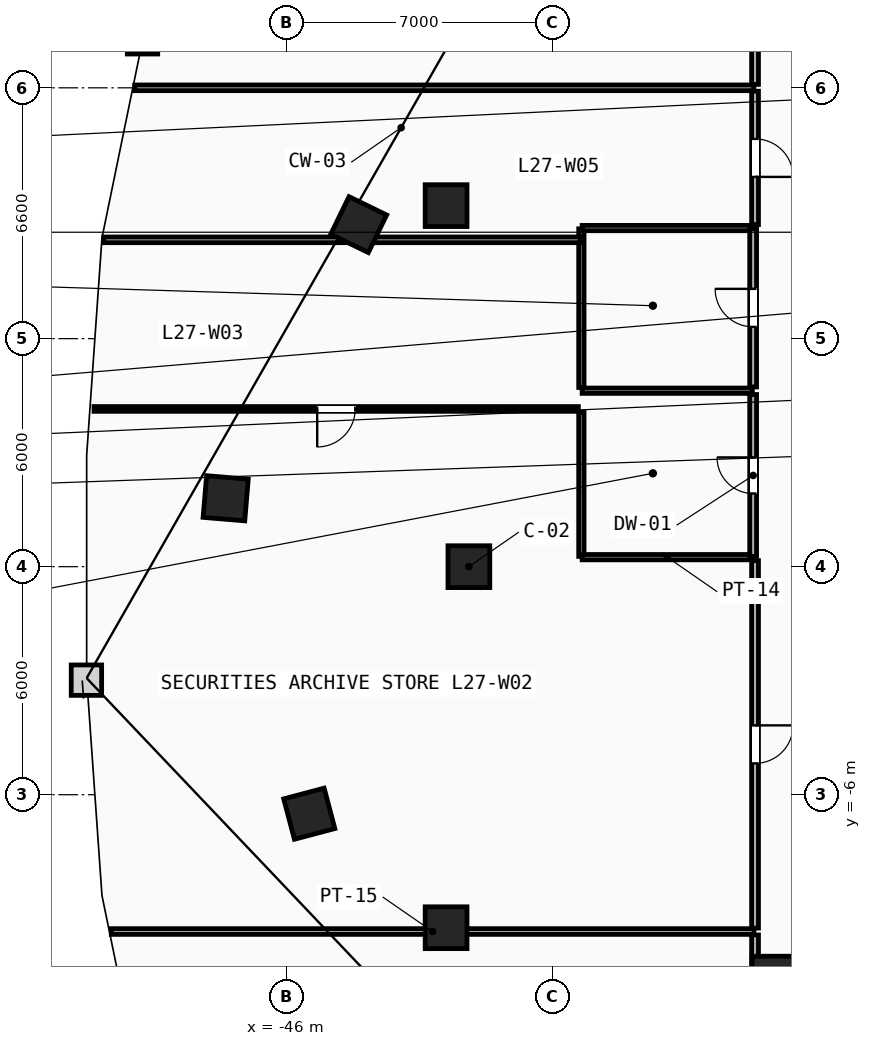
"""IFC4 building model, lengths in metres.
Left out: names, types, materials, properties, quantities, classifications, styles, units other than length and angle.
Written with IfcOpenShell. Run it as: python <this file> out.ifc"""

import sys

from ifc_helpers import new_model, si_unit, direction, frame, frame_2d, origin, origin_2d, place, context, subcontext, project, spatial, rectangle, extrude, element, fill, save


model = new_model("IFC4")
c1 = context("Model", 3, precision=1e-05, world=origin(), true_north=direction((0.0, 1.0)))
c2 = subcontext(c1, "Body", "Model", "MODEL_VIEW")
j1 = project(units=[si_unit("LENGTHUNIT", "METRE"), si_unit("PLANEANGLEUNIT", "RADIAN")], contexts=[c1])
p1 = place(None, origin())
s1 = spatial("IfcSite", under=j1, at=p1, CompositionType="ELEMENT")
p2 = place(p1, origin())
s2 = spatial("IfcBuilding", under=s1, at=p2, CompositionType="ELEMENT")
p3 = place(p2, frame((0.0, 0.0, 107.0)))
s3 = spatial("IfcBuildingStorey", under=s2, at=p3, CompositionType="ELEMENT", Elevation=107.0)
for number, where, z_axis, x_axis in (
    (1, (-41.2, 0.0, 0.0), (0.0, 0.0, 1.0), (1.0, 0.0, 0.0)),
    (2, (-41.8, 9.5, 0.0), (0.0, 0.0, 1.0), (1.0, 0.0, 0.0)),
    (3, (-41.8, -9.5, 0.0), (0.0, 0.0, 1.0), (1.0, 0.0, 0.0)),
    (4, (-33.2, -10.8, 0.0), (0.0, 0.0, 1.0), (1.0, 0.0, 0.0)),
    (5, (-44.1, 9.0, 0.0), (0.0, 0.0, 1.0), (-0.437, -0.899, 0.0)),
    (6, (-47.6, 1.8, 0.0), (0.0, 0.0, 1.0), (-0.084, -0.997, 0.0)),
    (7, (-45.4, -6.5, 0.0), (0.0, 0.0, 1.0), (0.256, -0.967, 0.0)),
):
    element("IfcColumn", number, at=place(p3, frame(where, z_axis=z_axis, x_axis=x_axis)), inside=s3, PredefinedType="COLUMN", context=c2, shape_type="SweptSolid", body=[
        extrude(rectangle(XDim=1.1, YDim=1.1, at=origin_2d()), origin(), (0.0, 0.0, 1.0), 3.6),
    ])
p4 = place(p3, frame((-38.24, 0.27, 0.0), z_axis=(0.0, 0.0, 1.0), x_axis=(0.0, 1.0, 0.0)))
e8 = element("IfcWall", 8, at=p4, inside=s3, PredefinedType="PARTITIONING", context=c2, shape_type="SweptSolid", body=[
    extrude(rectangle(XDim=3.795, YDim=0.14, at=frame_2d((1.897, 0.0))), origin(), (0.0, 0.0, 1.0), 3.3),
])
p5 = place(p3, frame((-38.24, 4.715, 0.0), z_axis=(0.0, 0.0, 1.0), x_axis=(0.0, 1.0, 0.0)))
e9 = element("IfcWall", 9, at=p5, inside=s3, PredefinedType="PARTITIONING", context=c2, shape_type="SweptSolid", body=[
    extrude(rectangle(XDim=4.175, YDim=0.14, at=frame_2d((2.087, 0.0))), origin(), (0.0, 0.0, 1.0), 3.3),
])
for number, where, z_axis, x_axis in (
    (10, (-38.22, 0.25, 0.0), (0.0, 0.0, 1.0), (1.0, 0.0, 0.0)),
    (11, (-38.22, 4.63, 0.0), (0.0, 0.0, 1.0), (1.0, 0.0, 0.0)),
    (12, (-38.22, 8.91, 0.0), (0.0, 0.0, 1.0), (1.0, 0.0, 0.0)),
):
    element("IfcWall", number, at=place(p3, frame(where, z_axis=z_axis, x_axis=x_axis)), inside=s3, PredefinedType="PARTITIONING", context=c2, shape_type="SweptSolid", body=[
        extrude(rectangle(XDim=4.48, YDim=0.14, at=frame_2d((2.24, 0.0))), origin(), (0.0, 0.0, 1.0), 3.3),
    ])
p6 = place(p3, frame((-33.72, 0.27, 0.0), z_axis=(0.0, 0.0, 1.0), x_axis=(0.0, 1.0, 0.0)))
e13 = element("IfcWall", 13, at=p6, inside=s3, PredefinedType="PARTITIONING", context=c2, shape_type="SweptSolid", body=[
    extrude(rectangle(XDim=4.26, YDim=0.18, at=frame_2d((2.13, 0.0))), origin(), (0.0, 0.0, 1.0), 3.3),
])
p7 = place(p6, frame((1.655, 0.0, 0.0)))
e14 = element("IfcOpeningElement", 14, at=p7, cuts=e13, PredefinedType="OPENING", context=c2, shape_type="SweptSolid", body=[
    extrude(rectangle(XDim=0.95, YDim=2.1, at=frame_2d((0.475, 1.05))), frame((0.0, 0.1, 0.0), z_axis=(0.0, -1.0, 0.0), x_axis=(1.0, 0.0, 0.0)), (0.0, 0.0, 1.0), 0.2),
])
p8 = place(p3, frame((-33.72, 4.73, 0.0), z_axis=(0.0, 0.0, 1.0), x_axis=(0.0, 1.0, 0.0)))
e15 = element("IfcWall", 15, at=p8, inside=s3, PredefinedType="PARTITIONING", context=c2, shape_type="SweptSolid", body=[
    extrude(rectangle(XDim=4.16, YDim=0.18, at=frame_2d((2.08, 0.0))), origin(), (0.0, 0.0, 1.0), 3.3),
])
p9 = place(p8, frame((1.58, 0.0, 0.0)))
e16 = element("IfcOpeningElement", 16, at=p9, cuts=e15, PredefinedType="OPENING", context=c2, shape_type="SweptSolid", body=[
    extrude(rectangle(XDim=1.0, YDim=2.15, at=frame_2d((0.5, 1.075))), frame((0.0, 0.1, 0.0), z_axis=(0.0, -1.0, 0.0), x_axis=(1.0, 0.0, 0.0)), (0.0, 0.0, 1.0), 0.2),
])
p10 = place(p3, frame((-50.61, -9.6, 0.0), z_axis=(0.0, 0.0, 1.0), x_axis=(1.0, 0.0, 0.0)))
e17 = element("IfcWall", 17, at=p10, inside=s3, PredefinedType="PARTITIONING", context=c2, shape_type="SweptSolid", body=[
    extrude(rectangle(XDim=16.91, YDim=0.15, at=frame_2d((8.455, 0.0))), origin(), (0.0, 0.0, 1.0), 2.605),
])
p11 = place(p3, frame((-50.809, 8.6, 0.0), z_axis=(0.0, 0.0, 1.0), x_axis=(1.0, 0.0, 0.0)))
e18 = element("IfcWall", 18, at=p11, inside=s3, PredefinedType="PARTITIONING", context=c2, shape_type="SweptSolid", body=[
    extrude(rectangle(XDim=12.539, YDim=0.15, at=frame_2d((6.269, 0.0))), origin(), (0.0, 0.0, 1.0), 3.3),
])
p12 = place(p3, frame((-49.993, 12.6, 0.0), z_axis=(0.0, 0.0, 1.0), x_axis=(1.0, 0.0, 0.0)))
e19 = element("IfcWall", 19, at=p12, inside=s3, PredefinedType="PARTITIONING", context=c2, shape_type="SweptSolid", body=[
    extrude(rectangle(XDim=16.293, YDim=0.15, at=frame_2d((8.146, 0.0))), origin(), (0.0, 0.0, 1.0), 3.3),
])
p13 = place(p3, frame((-33.67, -9.69, 0.0), z_axis=(0.0, 0.0, 1.0), x_axis=(0.0, -1.0, 0.0)))
e20 = element("IfcWall", 20, at=p13, inside=s3, PredefinedType="PARTITIONING", context=c2, shape_type="SweptSolid", body=[
    extrude(rectangle(XDim=1.71, YDim=0.18, at=frame_2d((0.855, 0.0))), origin(), (0.0, 0.0, 1.0), 3.3),
])
p14 = place(p3, frame((-33.67, 0.159, 0.0), z_axis=(0.0, 0.0, 1.0), x_axis=(0.0, -1.0, 0.0)))
e21 = element("IfcWall", 21, at=p14, inside=s3, PredefinedType="PARTITIONING", context=c2, shape_type="SweptSolid", body=[
    extrude(rectangle(XDim=9.669, YDim=0.18, at=frame_2d((4.834, 0.0))), origin(), (0.0, 0.0, 1.0), 3.3),
])
p15 = place(p14, frame((4.334, 0.0, 0.0)))
e22 = element("IfcOpeningElement", 22, at=p15, cuts=e21, PredefinedType="OPENING", context=c2, shape_type="SweptSolid", body=[
    extrude(rectangle(XDim=1.0, YDim=2.15, at=frame_2d((0.5, 1.075))), frame((0.0, 0.1, 0.0), z_axis=(0.0, -1.0, 0.0), x_axis=(1.0, 0.0, 0.0)), (0.0, 0.0, 1.0), 0.2),
])
p16 = place(p3, frame((-33.67, 17.428, 0.0), z_axis=(0.0, 0.0, 1.0), x_axis=(0.0, -1.0, 0.0)))
e23 = element("IfcWall", 23, at=p16, inside=s3, PredefinedType="PARTITIONING", context=c2, shape_type="SweptSolid", body=[
    extrude(rectangle(XDim=4.739, YDim=0.18, at=frame_2d((2.369, 0.0))), origin(), (0.0, 0.0, 1.0), 3.3),
])
p17 = place(p3, frame((-33.67, 12.51, 0.0), z_axis=(0.0, 0.0, 1.0), x_axis=(0.0, -1.0, 0.0)))
e24 = element("IfcWall", 24, at=p17, inside=s3, PredefinedType="PARTITIONING", context=c2, shape_type="SweptSolid", body=[
    extrude(rectangle(XDim=3.509, YDim=0.18, at=frame_2d((1.754, 0.0))), origin(), (0.0, 0.0, 1.0), 3.3),
])
p18 = place(p17, frame((1.254, 0.0, 0.0)))
e25 = element("IfcOpeningElement", 25, at=p18, cuts=e24, PredefinedType="OPENING", context=c2, shape_type="SweptSolid", body=[
    extrude(rectangle(XDim=1.0, YDim=2.15, at=frame_2d((0.5, 1.075))), frame((0.0, 0.1, 0.0), z_axis=(0.0, -1.0, 0.0), x_axis=(1.0, 0.0, 0.0)), (0.0, 0.0, 1.0), 0.2),
])
p19 = place(p3, frame((-38.32, 4.15, 0.0), z_axis=(0.0, 0.0, 1.0), x_axis=(-1.0, 0.0, 0.0)))
e26 = element("IfcWall", 26, at=p19, inside=s3, PredefinedType="PARTITIONING", context=c2, shape_type="SweptSolid", body=[
    extrude(rectangle(XDim=12.744, YDim=0.125, at=frame_2d((6.372, 0.0))), origin(), (0.0, 0.0, 1.0), 3.3),
])
p20 = place(p19, frame((5.872, 0.0, 0.0)))
e27 = element("IfcOpeningElement", 27, at=p20, cuts=e26, PredefinedType="OPENING", context=c2, shape_type="SweptSolid", body=[
    extrude(rectangle(XDim=1.0, YDim=2.15, at=frame_2d((0.5, 1.075))), frame((0.0, 0.073, 0.0), z_axis=(0.0, -1.0, 0.0), x_axis=(1.0, 0.0, 0.0)), (0.0, 0.0, 1.0), 0.145),
])
p21 = place(p20, origin())
e28 = element("IfcDoor", 28, at=p21, inside=s3, OperationType="SINGLE_SWING_RIGHT", PredefinedType="DOOR", context=c2, shape_type="SweptSolid", body=[
    extrude(rectangle(XDim=1.0, YDim=2.15, at=frame_2d((0.5, 1.075))), frame((0.0, 0.025, 0.0), z_axis=(0.0, -1.0, 0.0), x_axis=(1.0, 0.0, 0.0)), (0.0, 0.0, 1.0), 0.05),
])
fill(e27, e28)
p22 = place(p15, origin())
e29 = element("IfcDoor", 29, at=p22, inside=s3, OperationType="SINGLE_SWING_LEFT", PredefinedType="DOOR", context=c2, shape_type="SweptSolid", body=[
    extrude(rectangle(XDim=1.0, YDim=2.15, at=frame_2d((0.5, 1.075))), frame((0.0, 0.025, 0.0), z_axis=(0.0, -1.0, 0.0), x_axis=(1.0, 0.0, 0.0)), (0.0, 0.0, 1.0), 0.05),
])
fill(e22, e29)
p23 = place(p7, origin())
e30 = element("IfcDoor", 30, at=p23, inside=s3, OperationType="SINGLE_SWING_RIGHT", PredefinedType="DOOR", context=c2, shape_type="SweptSolid", body=[
    extrude(rectangle(XDim=0.95, YDim=2.1, at=frame_2d((0.475, 1.05))), frame((0.0, 0.025, 0.0), z_axis=(0.0, -1.0, 0.0), x_axis=(1.0, 0.0, 0.0)), (0.0, 0.0, 1.0), 0.05),
])
fill(e14, e30)
p24 = place(p9, origin())
e31 = element("IfcDoor", 31, at=p24, inside=s3, OperationType="SINGLE_SWING_RIGHT", PredefinedType="DOOR", context=c2, shape_type="SweptSolid", body=[
    extrude(rectangle(XDim=1.0, YDim=2.15, at=frame_2d((0.5, 1.075))), frame((0.0, 0.025, 0.0), z_axis=(0.0, -1.0, 0.0), x_axis=(1.0, 0.0, 0.0)), (0.0, 0.0, 1.0), 0.05),
])
fill(e16, e31)
p25 = place(p18, origin())
e32 = element("IfcDoor", 32, at=p25, inside=s3, OperationType="SINGLE_SWING_RIGHT", PredefinedType="DOOR", context=c2, shape_type="SweptSolid", body=[
    extrude(rectangle(XDim=1.0, YDim=2.15, at=frame_2d((0.5, 1.075))), frame((0.0, 0.025, 0.0), z_axis=(0.0, -1.0, 0.0), x_axis=(1.0, 0.0, 0.0)), (0.0, 0.0, 1.0), 0.05),
])
fill(e25, e32)
save(model, sys.argv[1])
